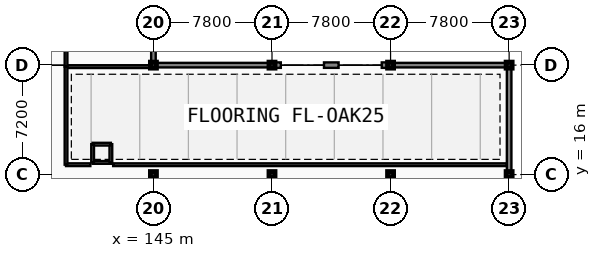
"""IFC4 building model, lengths in metres.
Left out: names, types, materials, properties, quantities, classifications, styles, units other than length and angle.
Written with IfcOpenShell. Run it as: python <this file> out.ifc"""

import sys

from ifc_helpers import new_model, si_unit, direction, frame, frame_2d, origin, origin_2d, place, context, subcontext, project, spatial, rectangle, extrude, element, fill, save


model = new_model("IFC4")
c1 = context("Model", 3, precision=1e-05, world=origin(), true_north=direction((0.0, 1.0)))
c2 = subcontext(c1, "Body", "Model", "MODEL_VIEW")
j1 = project(units=[si_unit("LENGTHUNIT", "METRE"), si_unit("PLANEANGLEUNIT", "RADIAN")], contexts=[c1])
p1 = place(None, origin())
s1 = spatial("IfcSite", under=j1, at=p1, CompositionType="ELEMENT")
p2 = place(p1, origin())
s2 = spatial("IfcBuilding", under=s1, at=p2, CompositionType="ELEMENT")
p3 = place(p2, frame((0.0, 0.0, 5.4)))
s3 = spatial("IfcBuildingStorey", under=s2, at=p3, CompositionType="ELEMENT", Elevation=5.4)
for number, where, z_axis, x_axis in (
    (1, (145.0, 16.0, 0.0), (0.0, 0.0, 1.0), (1.0, 0.0, 0.0)),
    (2, (145.0, 23.2, 0.0), (0.0, 0.0, 1.0), (1.0, 0.0, 0.0)),
    (3, (152.8, 16.0, 0.0), (0.0, 0.0, 1.0), (1.0, 0.0, 0.0)),
    (4, (152.8, 23.2, 0.0), (0.0, 0.0, 1.0), (1.0, 0.0, 0.0)),
    (5, (160.6, 16.0, 0.0), (0.0, 0.0, 1.0), (1.0, 0.0, 0.0)),
    (6, (160.6, 23.2, 0.0), (0.0, 0.0, 1.0), (1.0, 0.0, 0.0)),
    (7, (168.4, 16.0, 0.0), (0.0, 0.0, 1.0), (1.0, 0.0, 0.0)),
    (8, (168.4, 23.2, 0.0), (0.0, 0.0, 1.0), (1.0, 0.0, 0.0)),
):
    element("IfcColumn", number, at=place(p3, frame(where, z_axis=z_axis, x_axis=x_axis)), inside=s3, PredefinedType="COLUMN", context=c2, shape_type="SweptSolid", body=[
        extrude(rectangle(XDim=0.4, YDim=0.4, at=origin_2d()), origin(), (0.0, 0.0, 1.0), 4.2),
    ])
p4 = place(p3, frame((139.25, 16.65, 0.0), z_axis=(0.0, 0.0, 1.0), x_axis=(1.0, 0.0, 0.0)))
e9 = element("IfcWall", 9, at=p4, inside=s3, PredefinedType="PARTITIONING", context=c2, shape_type="SweptSolid", body=[
    extrude(rectangle(XDim=1.6, YDim=0.18, at=frame_2d((0.8, 0.0))), origin(), (0.0, 0.0, 1.0), 3.84),
])
p5 = place(p3, frame((142.35, 16.65, 0.0), z_axis=(0.0, 0.0, 1.0), x_axis=(1.0, 0.0, 0.0)))
e10 = element("IfcWall", 10, at=p5, inside=s3, PredefinedType="PARTITIONING", context=c2, shape_type="SweptSolid", body=[
    extrude(rectangle(XDim=25.91, YDim=0.18, at=frame_2d((12.955, 0.0))), origin(), (0.0, 0.0, 1.0), 3.59),
])
p6 = place(p5, frame((7.971, 0.0, -0.01)))
e11 = element("IfcOpeningElement", 11, at=p6, cuts=e10, PredefinedType="OPENING", context=c2, shape_type="SweptSolid", body=[
    extrude(rectangle(XDim=1.0, YDim=2.16, at=frame_2d((0.5, 1.08))), frame((0.0, 0.1, 0.0), z_axis=(0.0, -1.0, 0.0), x_axis=(1.0, 0.0, 0.0)), (0.0, 0.0, 1.0), 0.2),
])
p7 = place(p3, frame((139.25, 23.1, 0.0), z_axis=(0.0, 0.0, 1.0), x_axis=(1.0, 0.0, 0.0)))
e12 = element("IfcWall", 12, at=p7, inside=s3, PredefinedType="PARTITIONING", context=c2, shape_type="SweptSolid", body=[
    extrude(rectangle(XDim=5.61, YDim=0.18, at=frame_2d((2.805, 0.0))), origin(), (0.0, 0.0, 1.0), 3.59),
])
p8 = place(p3, frame((139.25, 16.65, 0.0), z_axis=(0.0, 0.0, 1.0), x_axis=(0.0, 1.0, 0.0)))
e13 = element("IfcWall", 13, at=p8, inside=s3, PredefinedType="PARTITIONING", context=c2, shape_type="SweptSolid", body=[
    extrude(rectangle(XDim=6.45, YDim=0.18, at=frame_2d((3.225, 0.0))), origin(), (0.0, 0.0, 1.0), 3.67),
])
p9 = place(p3, frame((139.25, 23.1, 0.0), z_axis=(0.0, 0.0, 1.0), x_axis=(0.0, 1.0, 0.0)))
e14 = element("IfcWall", 14, at=p9, inside=s3, PredefinedType="PARTITIONING", context=c2, shape_type="SweptSolid", body=[
    extrude(rectangle(XDim=12.8, YDim=0.18, at=frame_2d((6.4, 0.0))), origin(), (0.0, 0.0, 1.0), 3.67),
])
p10 = place(p9, frame((5.9, 0.0, -0.01)))
e15 = element("IfcOpeningElement", 15, at=p10, cuts=e14, PredefinedType="OPENING", context=c2, shape_type="SweptSolid", body=[
    extrude(rectangle(XDim=1.0, YDim=2.16, at=frame_2d((0.5, 1.08))), frame((0.0, 0.1, 0.0), z_axis=(0.0, -1.0, 0.0), x_axis=(1.0, 0.0, 0.0)), (0.0, 0.0, 1.0), 0.2),
])
p11 = place(p3, frame((152.8, 23.2, 0.0), z_axis=(0.0, 0.0, 1.0), x_axis=(-1.0, 0.0, 0.0)))
e16 = element("IfcWall", 16, at=p11, inside=s3, PredefinedType="SOLIDWALL", context=c2, shape_type="SweptSolid", body=[
    extrude(rectangle(XDim=7.8, YDim=0.3, at=frame_2d((3.9, 0.0))), origin(), (0.0, 0.0, 1.0), 3.59),
])
p12 = place(p11, frame((0.46, 0.0, 0.9)))
e17 = element("IfcOpeningElement", 17, at=p12, cuts=e16, PredefinedType="OPENING", context=c2, shape_type="SweptSolid", body=[
    extrude(rectangle(XDim=2.4, YDim=2.25, at=frame_2d((1.2, 1.125))), frame((0.0, 0.16, 0.0), z_axis=(0.0, -1.0, 0.0), x_axis=(1.0, 0.0, 0.0)), (0.0, 0.0, 1.0), 0.32),
])
p13 = place(p11, frame((4.86, 0.0, 0.9)))
e18 = element("IfcOpeningElement", 18, at=p13, cuts=e16, PredefinedType="OPENING", context=c2, shape_type="SweptSolid", body=[
    extrude(rectangle(XDim=2.4, YDim=2.25, at=frame_2d((1.2, 1.125))), frame((0.0, 0.16, 0.0), z_axis=(0.0, -1.0, 0.0), x_axis=(1.0, 0.0, 0.0)), (0.0, 0.0, 1.0), 0.32),
])
p14 = place(p3, frame((157.18, 23.2, 0.0), z_axis=(0.0, 0.0, 1.0), x_axis=(-1.0, 0.0, 0.0)))
e19 = element("IfcWall", 19, at=p14, inside=s3, PredefinedType="SOLIDWALL", context=c2, shape_type="SweptSolid", body=[
    extrude(rectangle(XDim=0.96, YDim=0.36, at=frame_2d((0.48, 0.0))), origin(), (0.0, 0.0, 1.0), 3.59),
])
for number, where, z_axis, x_axis in (
    (20, (160.47, 23.2, 0.0), (0.0, 0.0, 1.0), (-1.0, 0.0, 0.0)),
    (21, (153.38, 23.2, 0.0), (0.0, 0.0, 1.0), (-1.0, 0.0, 0.0)),
):
    element("IfcWall", number, at=place(p3, frame(where, z_axis=z_axis, x_axis=x_axis)), inside=s3, PredefinedType="SOLIDWALL", context=c2, shape_type="SweptSolid", body=[
        extrude(rectangle(XDim=0.45, YDim=0.36, at=frame_2d((0.225, 0.0))), origin(), (0.0, 0.0, 1.0), 3.59),
    ])
p15 = place(p3, frame((168.4, 23.2, 0.0), z_axis=(0.0, 0.0, 1.0), x_axis=(-1.0, 0.0, 0.0)))
e22 = element("IfcWall", 22, at=p15, inside=s3, PredefinedType="SOLIDWALL", context=c2, shape_type="SweptSolid", body=[
    extrude(rectangle(XDim=7.8, YDim=0.3, at=frame_2d((3.9, 0.0))), origin(), (0.0, 0.0, 1.0), 3.59),
])
p16 = place(p15, frame((0.46, 0.0, 0.9)))
e23 = element("IfcOpeningElement", 23, at=p16, cuts=e22, PredefinedType="OPENING", context=c2, shape_type="SweptSolid", body=[
    extrude(rectangle(XDim=2.4, YDim=2.25, at=frame_2d((1.2, 1.125))), frame((0.0, 0.16, 0.0), z_axis=(0.0, -1.0, 0.0), x_axis=(1.0, 0.0, 0.0)), (0.0, 0.0, 1.0), 0.32),
])
p17 = place(p15, frame((4.86, 0.0, 0.9)))
e24 = element("IfcOpeningElement", 24, at=p17, cuts=e22, PredefinedType="OPENING", context=c2, shape_type="SweptSolid", body=[
    extrude(rectangle(XDim=2.4, YDim=2.25, at=frame_2d((1.2, 1.125))), frame((0.0, 0.16, 0.0), z_axis=(0.0, -1.0, 0.0), x_axis=(1.0, 0.0, 0.0)), (0.0, 0.0, 1.0), 0.32),
])
p18 = place(p3, frame((168.4, 8.8, 0.0), z_axis=(0.0, 0.0, 1.0), x_axis=(0.0, 1.0, 0.0)))
e25 = element("IfcWall", 25, at=p18, inside=s3, PredefinedType="SOLIDWALL", context=c2, shape_type="SweptSolid", body=[
    extrude(rectangle(XDim=7.2, YDim=0.3, at=frame_2d((3.6, 0.0))), origin(), (0.0, 0.0, 1.0), 3.59),
])
p19 = place(p18, frame((0.46, 0.0, 0.9)))
e26 = element("IfcOpeningElement", 26, at=p19, cuts=e25, PredefinedType="OPENING", context=c2, shape_type="SweptSolid", body=[
    extrude(rectangle(XDim=1.8, YDim=2.25, at=frame_2d((0.9, 1.125))), frame((0.0, 0.16, 0.0), z_axis=(0.0, -1.0, 0.0), x_axis=(1.0, 0.0, 0.0)), (0.0, 0.0, 1.0), 0.32),
])
p20 = place(p18, frame((3.06, 0.0, 0.9)))
e27 = element("IfcOpeningElement", 27, at=p20, cuts=e25, PredefinedType="OPENING", context=c2, shape_type="SweptSolid", body=[
    extrude(rectangle(XDim=1.8, YDim=2.25, at=frame_2d((0.9, 1.125))), frame((0.0, 0.16, 0.0), z_axis=(0.0, -1.0, 0.0), x_axis=(1.0, 0.0, 0.0)), (0.0, 0.0, 1.0), 0.32),
])
p21 = place(p3, frame((168.4, 16.0, 0.0), z_axis=(0.0, 0.0, 1.0), x_axis=(0.0, 1.0, 0.0)))
e28 = element("IfcWall", 28, at=p21, inside=s3, PredefinedType="SOLIDWALL", context=c2, shape_type="SweptSolid", body=[
    extrude(rectangle(XDim=7.2, YDim=0.3, at=frame_2d((3.6, 0.0))), origin(), (0.0, 0.0, 1.0), 3.59),
])
p22 = place(p21, frame((0.86, 0.0, 0.9)))
e29 = element("IfcOpeningElement", 29, at=p22, cuts=e28, PredefinedType="OPENING", context=c2, shape_type="SweptSolid", body=[
    extrude(rectangle(XDim=1.8, YDim=2.25, at=frame_2d((0.9, 1.125))), frame((0.0, 0.16, 0.0), z_axis=(0.0, -1.0, 0.0), x_axis=(1.0, 0.0, 0.0)), (0.0, 0.0, 1.0), 0.32),
])
p23 = place(p21, frame((4.86, 0.0, 0.9)))
e30 = element("IfcOpeningElement", 30, at=p23, cuts=e28, PredefinedType="OPENING", context=c2, shape_type="SweptSolid", body=[
    extrude(rectangle(XDim=1.8, YDim=2.25, at=frame_2d((0.9, 1.125))), frame((0.0, 0.16, 0.0), z_axis=(0.0, -1.0, 0.0), x_axis=(1.0, 0.0, 0.0)), (0.0, 0.0, 1.0), 0.32),
])
p24 = place(p3, frame((145.0, 23.2, 0.0), z_axis=(0.0, 0.0, 1.0), x_axis=(0.0, 1.0, 0.0)))
e31 = element("IfcWall", 31, at=p24, inside=s3, PredefinedType="SOLIDWALL", context=c2, shape_type="SweptSolid", body=[
    extrude(rectangle(XDim=7.2, YDim=0.3, at=frame_2d((3.6, 0.0))), origin(), (0.0, 0.0, 1.0), 3.59),
])
p25 = place(p24, frame((0.46, 0.0, 0.9)))
e32 = element("IfcOpeningElement", 32, at=p25, cuts=e31, PredefinedType="OPENING", context=c2, shape_type="SweptSolid", body=[
    extrude(rectangle(XDim=1.8, YDim=2.25, at=frame_2d((0.9, 1.125))), frame((0.0, 0.16, 0.0), z_axis=(0.0, -1.0, 0.0), x_axis=(1.0, 0.0, 0.0)), (0.0, 0.0, 1.0), 0.32),
])
p26 = place(p24, frame((4.86, 0.0, 0.9)))
e33 = element("IfcOpeningElement", 33, at=p26, cuts=e31, PredefinedType="OPENING", context=c2, shape_type="SweptSolid", body=[
    extrude(rectangle(XDim=1.8, YDim=2.25, at=frame_2d((0.9, 1.125))), frame((0.0, 0.16, 0.0), z_axis=(0.0, -1.0, 0.0), x_axis=(1.0, 0.0, 0.0)), (0.0, 0.0, 1.0), 0.32),
])
p27 = place(p3, frame((141.0, 16.8, 0.0), z_axis=(0.0, 0.0, 1.0), x_axis=(1.0, 0.0, 0.0)))
e34 = element("IfcWall", 34, at=p27, inside=s3, PredefinedType="SOLIDWALL", context=c2, shape_type="SweptSolid", body=[
    extrude(rectangle(XDim=1.2, YDim=0.18, at=frame_2d((0.6, 0.0))), origin(), (0.0, 0.0, 1.0), 3.97),
])
p28 = place(p27, frame((0.2, 0.0, -0.01)))
e35 = element("IfcOpeningElement", 35, at=p28, cuts=e34, PredefinedType="OPENING", context=c2, shape_type="SweptSolid", body=[
    extrude(rectangle(XDim=0.8, YDim=2.06, at=frame_2d((0.4, 1.03))), frame((0.0, 0.1, 0.0), z_axis=(0.0, -1.0, 0.0), x_axis=(1.0, 0.0, 0.0)), (0.0, 0.0, 1.0), 0.2),
])
for number, where, z_axis, x_axis in (
    (36, (142.2, 16.8, 0.0), (0.0, 0.0, 1.0), (0.0, 1.0, 0.0)),
    (37, (142.2, 18.0, 0.0), (0.0, 0.0, 1.0), (-1.0, 0.0, 0.0)),
    (38, (141.0, 18.0, 0.0), (0.0, 0.0, 1.0), (0.0, -1.0, 0.0)),
):
    element("IfcWall", number, at=place(p3, frame(where, z_axis=z_axis, x_axis=x_axis)), inside=s3, PredefinedType="SOLIDWALL", context=c2, shape_type="SweptSolid", body=[
        extrude(rectangle(XDim=1.2, YDim=0.18, at=frame_2d((0.6, 0.0))), origin(), (0.0, 0.0, 1.0), 3.97),
    ])
p29 = place(p6, frame((0.0, 0.0, 0.01)))
e39 = element("IfcDoor", 39, at=p29, inside=s3, OperationType="SINGLE_SWING_RIGHT", PredefinedType="DOOR", context=c2, shape_type="SweptSolid", body=[
    extrude(rectangle(XDim=1.0, YDim=2.15, at=frame_2d((0.5, 1.075))), frame((0.0, 0.025, 0.0), z_axis=(0.0, -1.0, 0.0), x_axis=(1.0, 0.0, 0.0)), (0.0, 0.0, 1.0), 0.05),
])
fill(e11, e39)
p30 = place(p12, origin())
e40 = element("IfcWindow", 40, at=p30, inside=s3, PartitioningType="TRIPLE_PANEL_VERTICAL", PredefinedType="WINDOW", context=c2, shape_type="SweptSolid", body=[
    extrude(rectangle(XDim=2.4, YDim=2.25, at=frame_2d((1.2, 1.125))), frame((0.0, 0.03, 0.0), z_axis=(0.0, -1.0, 0.0), x_axis=(1.0, 0.0, 0.0)), (0.0, 0.0, 1.0), 0.06),
])
fill(e17, e40)
p31 = place(p13, origin())
e41 = element("IfcWindow", 41, at=p31, inside=s3, PartitioningType="TRIPLE_PANEL_VERTICAL", PredefinedType="WINDOW", context=c2, shape_type="SweptSolid", body=[
    extrude(rectangle(XDim=2.4, YDim=2.25, at=frame_2d((1.2, 1.125))), frame((0.0, 0.03, 0.0), z_axis=(0.0, -1.0, 0.0), x_axis=(1.0, 0.0, 0.0)), (0.0, 0.0, 1.0), 0.06),
])
fill(e18, e41)
p32 = place(p16, origin())
e42 = element("IfcWindow", 42, at=p32, inside=s3, PartitioningType="TRIPLE_PANEL_VERTICAL", PredefinedType="WINDOW", context=c2, shape_type="SweptSolid", body=[
    extrude(rectangle(XDim=2.4, YDim=2.25, at=frame_2d((1.2, 1.125))), frame((0.0, 0.03, 0.0), z_axis=(0.0, -1.0, 0.0), x_axis=(1.0, 0.0, 0.0)), (0.0, 0.0, 1.0), 0.06),
])
fill(e23, e42)
p33 = place(p17, origin())
e43 = element("IfcWindow", 43, at=p33, inside=s3, PartitioningType="TRIPLE_PANEL_VERTICAL", PredefinedType="WINDOW", context=c2, shape_type="SweptSolid", body=[
    extrude(rectangle(XDim=2.4, YDim=2.25, at=frame_2d((1.2, 1.125))), frame((0.0, 0.03, 0.0), z_axis=(0.0, -1.0, 0.0), x_axis=(1.0, 0.0, 0.0)), (0.0, 0.0, 1.0), 0.06),
])
fill(e24, e43)
p34 = place(p22, origin())
e44 = element("IfcWindow", 44, at=p34, inside=s3, PartitioningType="DOUBLE_PANEL_VERTICAL", PredefinedType="WINDOW", context=c2, shape_type="SweptSolid", body=[
    extrude(rectangle(XDim=1.8, YDim=2.25, at=frame_2d((0.9, 1.125))), frame((0.0, 0.03, 0.0), z_axis=(0.0, -1.0, 0.0), x_axis=(1.0, 0.0, 0.0)), (0.0, 0.0, 1.0), 0.06),
])
fill(e29, e44)
p35 = place(p23, origin())
e45 = element("IfcWindow", 45, at=p35, inside=s3, PartitioningType="DOUBLE_PANEL_VERTICAL", PredefinedType="WINDOW", context=c2, shape_type="SweptSolid", body=[
    extrude(rectangle(XDim=1.8, YDim=2.25, at=frame_2d((0.9, 1.125))), frame((0.0, 0.03, 0.0), z_axis=(0.0, -1.0, 0.0), x_axis=(1.0, 0.0, 0.0)), (0.0, 0.0, 1.0), 0.06),
])
fill(e30, e45)
p36 = place(p25, origin())
e46 = element("IfcWindow", 46, at=p36, inside=s3, PartitioningType="DOUBLE_PANEL_VERTICAL", PredefinedType="WINDOW", context=c2, shape_type="SweptSolid", body=[
    extrude(rectangle(XDim=1.8, YDim=2.25, at=frame_2d((0.9, 1.125))), frame((0.0, 0.03, 0.0), z_axis=(0.0, -1.0, 0.0), x_axis=(1.0, 0.0, 0.0)), (0.0, 0.0, 1.0), 0.06),
])
fill(e32, e46)
p37 = place(p28, frame((0.0, 0.0, 0.01)))
e47 = element("IfcDoor", 47, at=p37, inside=s3, OperationType="SINGLE_SWING_RIGHT", PredefinedType="DOOR", context=c2, shape_type="SweptSolid", body=[
    extrude(rectangle(XDim=0.8, YDim=2.05, at=frame_2d((0.4, 1.025))), frame((0.0, 0.025, 0.0), z_axis=(0.0, -1.0, 0.0), x_axis=(1.0, 0.0, 0.0)), (0.0, 0.0, 1.0), 0.05),
])
fill(e35, e47)
save(model, sys.argv[1])
